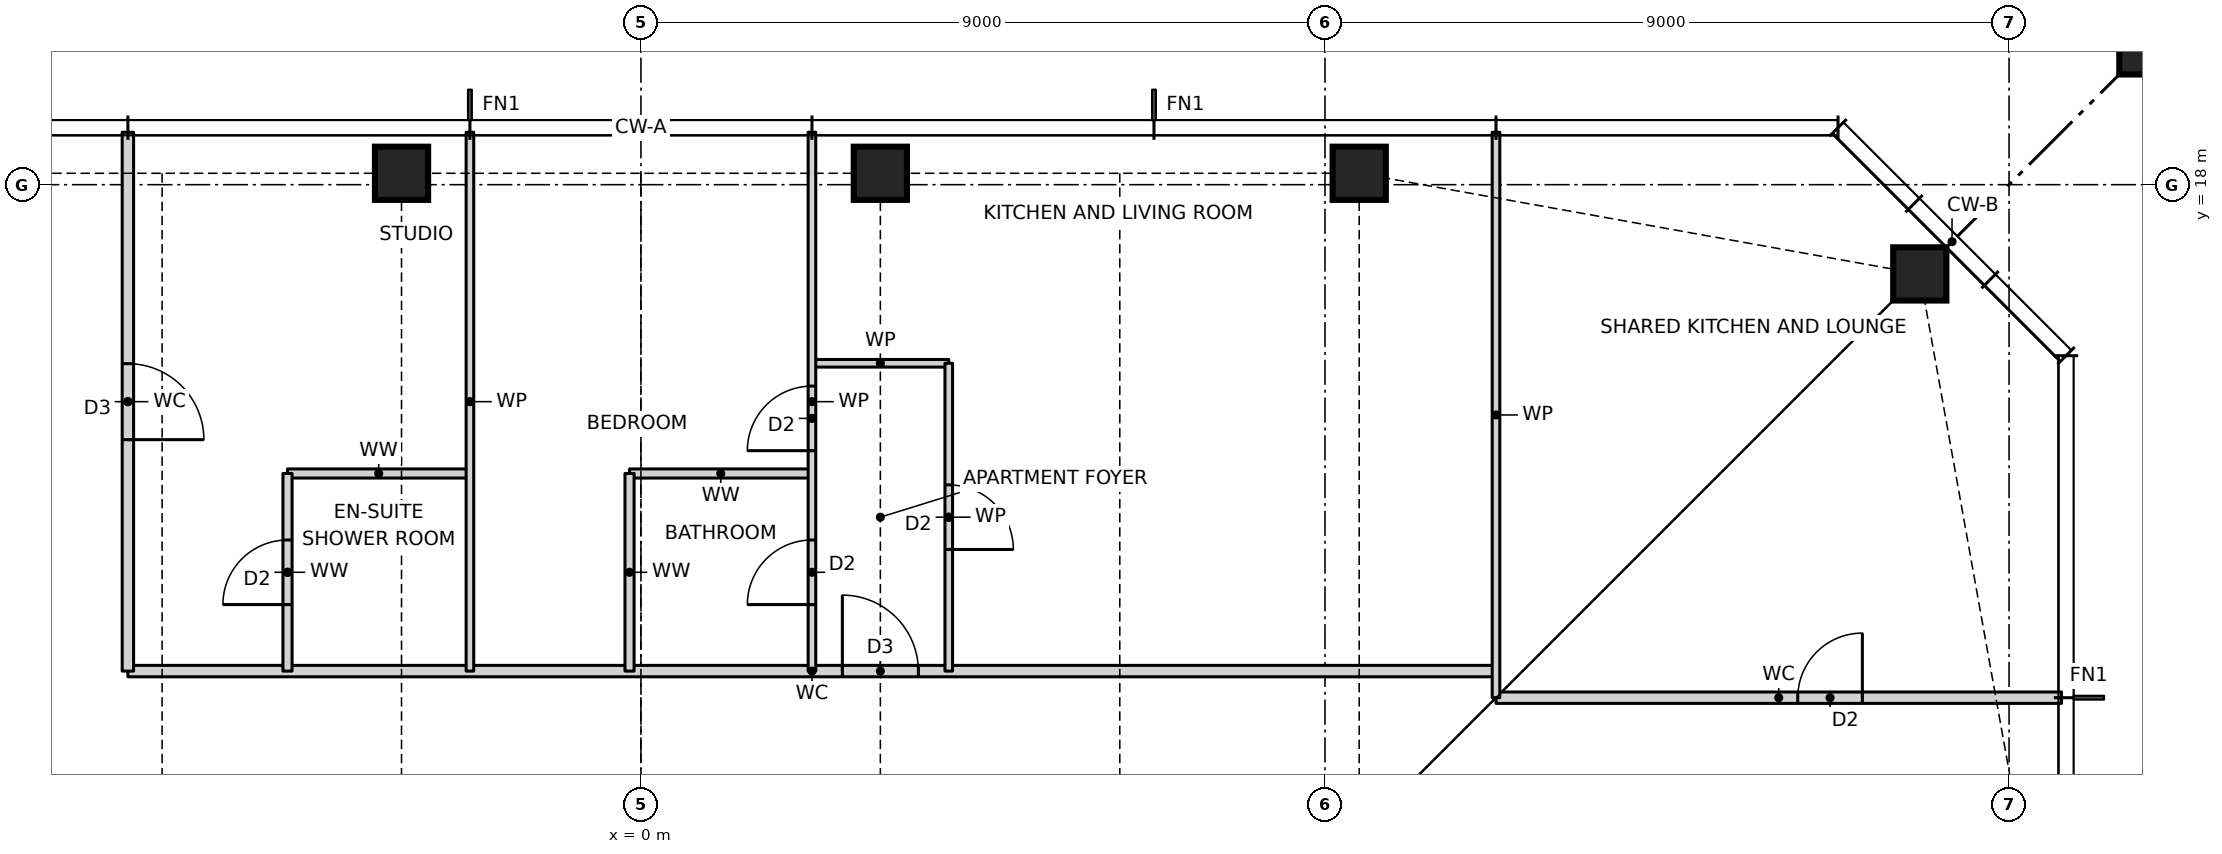
"""IFC4 building model, lengths in metres.
Left out: names, types, materials, properties, quantities, classifications, styles, units other than length and angle.
Written with IfcOpenShell. Run it as: python <this file> out.ifc"""

import sys

from ifc_helpers import new_model, si_unit, direction, frame, frame_2d, origin, origin_2d, place, context, subcontext, project, spatial, rectangle, hollow_rectangle, i_section, extrude, element, fill, save


model = new_model("IFC4")
c1 = context("Model", 3, precision=1e-05, world=origin(), true_north=direction((0.0, 1.0)))
c2 = subcontext(c1, "Body", "Model", "MODEL_VIEW")
j1 = project(units=[si_unit("LENGTHUNIT", "METRE"), si_unit("PLANEANGLEUNIT", "RADIAN")], contexts=[c1])
p1 = place(None, origin())
s1 = spatial("IfcSite", under=j1, at=p1, CompositionType="ELEMENT")
p2 = place(p1, origin())
s2 = spatial("IfcBuilding", under=s1, at=p2, CompositionType="ELEMENT")
p3 = place(p2, frame((0.0, 0.0, 167.0)))
s3 = spatial("IfcBuildingStorey", under=s2, at=p3, CompositionType="ELEMENT", Elevation=167.0)
for number, where, z_axis, x_axis in (
    (1, (16.826, 16.826, 0.0), (0.0, 0.0, 1.0), (1.0, 0.0, 0.0)),
    (2, (9.45, 18.15, 0.0), (0.0, 0.0, 1.0), (1.0, 0.0, 0.0)),
    (3, (3.15, 18.15, 0.0), (0.0, 0.0, 1.0), (1.0, 0.0, 0.0)),
    (4, (-3.15, 18.15, 0.0), (0.0, 0.0, 1.0), (1.0, 0.0, 0.0)),
):
    element("IfcColumn", number, at=place(p3, frame(where, z_axis=z_axis, x_axis=x_axis)), inside=s3, PredefinedType="COLUMN", context=c2, shape_type="SweptSolid", body=[
        extrude(hollow_rectangle(XDim=0.7, YDim=0.7, WallThickness=0.06, at=origin_2d()), origin(), (0.0, 0.0, 1.0), 3.5),
    ])
p4 = place(p3, frame((21.65, 21.65, 0.0), z_axis=(0.0, 0.0, 1.0), x_axis=(1.0, 0.0, 0.0)))
e5 = element("IfcColumn", 5, at=p4, inside=s3, PredefinedType="COLUMN", context=c2, shape_type="SweptSolid", body=[
    extrude(rectangle(XDim=4.4, YDim=4.4, at=origin_2d()), origin(), (0.0, 0.0, 1.0), 3.5),
    extrude(i_section(OverallWidth=0.478, OverallDepth=0.599, WebThickness=0.1, FlangeThickness=0.14, at=origin_2d()), origin(), (0.0, 0.0, 1.0), 3.5),
])
p5 = place(p3, frame((11.25, 11.25, 0.0), z_axis=(0.0, 0.0, 1.0), x_axis=(1.0, 0.0, 0.0)))
e6 = element("IfcWall", 6, at=p5, inside=s3, PredefinedType="PARTITIONING", context=c2, shape_type="SweptSolid", body=[
    extrude(rectangle(XDim=7.44, YDim=0.15, at=frame_2d((3.72, 0.0))), origin(), (0.0, 0.0, 1.0), 3.27),
])
p6 = place(p5, frame((3.97, 0.0, 0.0)))
e7 = element("IfcOpeningElement", 7, at=p6, cuts=e6, PredefinedType="OPENING", context=c2, shape_type="SweptSolid", body=[
    extrude(rectangle(XDim=0.85, YDim=2.1, at=frame_2d((0.425, 1.05))), frame((0.0, 0.085, 0.0), z_axis=(0.0, -1.0, 0.0), x_axis=(1.0, 0.0, 0.0)), (0.0, 0.0, 1.0), 0.17),
])
p7 = place(p3, frame((-6.75, 11.6, 0.0), z_axis=(0.0, 0.0, 1.0), x_axis=(1.0, 0.0, 0.0)))
e8 = element("IfcWall", 8, at=p7, inside=s3, PredefinedType="PARTITIONING", context=c2, shape_type="SweptSolid", body=[
    extrude(rectangle(XDim=18.0, YDim=0.15, at=frame_2d((9.0, 0.0))), origin(), (0.0, 0.0, 1.0), 3.27),
])
p8 = place(p7, frame((9.4, 0.0, 0.0)))
e9 = element("IfcOpeningElement", 9, at=p8, cuts=e8, PredefinedType="OPENING", context=c2, shape_type="SweptSolid", body=[
    extrude(rectangle(XDim=1.0, YDim=2.1, at=frame_2d((0.5, 1.05))), frame((0.0, 0.085, 0.0), z_axis=(0.0, -1.0, 0.0), x_axis=(1.0, 0.0, 0.0)), (0.0, 0.0, 1.0), 0.17),
])
for number, where, z_axis, x_axis in (
    (10, (-4.65, 14.2, 0.0), (0.0, 0.0, 1.0), (1.0, 0.0, 0.0)),
    (11, (-0.15, 14.2, 0.0), (0.0, 0.0, 1.0), (1.0, 0.0, 0.0)),
):
    element("IfcWall", number, at=place(p3, frame(where, z_axis=z_axis, x_axis=x_axis)), inside=s3, PredefinedType="PARTITIONING", context=c2, shape_type="SweptSolid", body=[
        extrude(rectangle(XDim=2.4, YDim=0.12, at=frame_2d((1.2, 0.0))), origin(), (0.0, 0.0, 1.0), 3.27),
    ])
p9 = place(p3, frame((2.25, 15.65, 0.0), z_axis=(0.0, 0.0, 1.0), x_axis=(1.0, 0.0, 0.0)))
e12 = element("IfcWall", 12, at=p9, inside=s3, PredefinedType="PARTITIONING", context=c2, shape_type="SweptSolid", body=[
    extrude(rectangle(XDim=1.8, YDim=0.1, at=frame_2d((0.9, 0.0))), origin(), (0.0, 0.0, 1.0), 3.27),
])
p10 = place(p3, frame((11.25, 11.25, 0.0), z_axis=(0.0, 0.0, 1.0), x_axis=(0.0, 1.0, 0.0)))
e13 = element("IfcWall", 13, at=p10, inside=s3, PredefinedType="PARTITIONING", context=c2, shape_type="SweptSolid", body=[
    extrude(rectangle(XDim=7.44, YDim=0.1, at=frame_2d((3.72, 0.0))), origin(), (0.0, 0.0, 1.0), 3.27),
])
p11 = place(p3, frame((4.05, 11.6, 0.0), z_axis=(0.0, 0.0, 1.0), x_axis=(0.0, 1.0, 0.0)))
e14 = element("IfcWall", 14, at=p11, inside=s3, PredefinedType="PARTITIONING", context=c2, shape_type="SweptSolid", body=[
    extrude(rectangle(XDim=4.05, YDim=0.1, at=frame_2d((2.025, 0.0))), origin(), (0.0, 0.0, 1.0), 3.27),
])
p12 = place(p11, frame((1.6, 0.0, 0.0)))
e15 = element("IfcOpeningElement", 15, at=p12, cuts=e14, PredefinedType="OPENING", context=c2, shape_type="SweptSolid", body=[
    extrude(rectangle(XDim=0.85, YDim=2.1, at=frame_2d((0.425, 1.05))), frame((0.0, 0.06, 0.0), z_axis=(0.0, -1.0, 0.0), x_axis=(1.0, 0.0, 0.0)), (0.0, 0.0, 1.0), 0.12),
])
p13 = place(p3, frame((2.25, 11.6, 0.0), z_axis=(0.0, 0.0, 1.0), x_axis=(0.0, 1.0, 0.0)))
e16 = element("IfcWall", 16, at=p13, inside=s3, PredefinedType="PARTITIONING", context=c2, shape_type="SweptSolid", body=[
    extrude(rectangle(XDim=7.09, YDim=0.1, at=frame_2d((3.545, 0.0))), origin(), (0.0, 0.0, 1.0), 3.27),
])
p14 = place(p13, frame((2.9, 0.0, 0.0)))
e17 = element("IfcOpeningElement", 17, at=p14, cuts=e16, PredefinedType="OPENING", context=c2, shape_type="SweptSolid", body=[
    extrude(rectangle(XDim=0.85, YDim=2.1, at=frame_2d((0.425, 1.05))), frame((0.0, 0.06, 0.0), z_axis=(0.0, -1.0, 0.0), x_axis=(1.0, 0.0, 0.0)), (0.0, 0.0, 1.0), 0.12),
])
p15 = place(p13, frame((0.875, 0.0, 0.0)))
e18 = element("IfcOpeningElement", 18, at=p15, cuts=e16, PredefinedType="OPENING", context=c2, shape_type="SweptSolid", body=[
    extrude(rectangle(XDim=0.85, YDim=2.1, at=frame_2d((0.425, 1.05))), frame((0.0, 0.06, 0.0), z_axis=(0.0, -1.0, 0.0), x_axis=(1.0, 0.0, 0.0)), (0.0, 0.0, 1.0), 0.12),
])
p16 = place(p3, frame((-0.15, 11.6, 0.0), z_axis=(0.0, 0.0, 1.0), x_axis=(0.0, 1.0, 0.0)))
e19 = element("IfcWall", 19, at=p16, inside=s3, PredefinedType="PARTITIONING", context=c2, shape_type="SweptSolid", body=[
    extrude(rectangle(XDim=2.6, YDim=0.12, at=frame_2d((1.3, 0.0))), origin(), (0.0, 0.0, 1.0), 3.27),
])
p17 = place(p3, frame((-2.25, 11.6, 0.0), z_axis=(0.0, 0.0, 1.0), x_axis=(0.0, 1.0, 0.0)))
e20 = element("IfcWall", 20, at=p17, inside=s3, PredefinedType="PARTITIONING", context=c2, shape_type="SweptSolid", body=[
    extrude(rectangle(XDim=7.09, YDim=0.1, at=frame_2d((3.545, 0.0))), origin(), (0.0, 0.0, 1.0), 3.27),
])
p18 = place(p3, frame((-4.65, 11.6, 0.0), z_axis=(0.0, 0.0, 1.0), x_axis=(0.0, 1.0, 0.0)))
e21 = element("IfcWall", 21, at=p18, inside=s3, PredefinedType="PARTITIONING", context=c2, shape_type="SweptSolid", body=[
    extrude(rectangle(XDim=2.6, YDim=0.12, at=frame_2d((1.3, 0.0))), origin(), (0.0, 0.0, 1.0), 3.27),
])
p19 = place(p18, frame((0.875, 0.0, 0.0)))
e22 = element("IfcOpeningElement", 22, at=p19, cuts=e21, PredefinedType="OPENING", context=c2, shape_type="SweptSolid", body=[
    extrude(rectangle(XDim=0.85, YDim=2.1, at=frame_2d((0.425, 1.05))), frame((0.0, 0.07, 0.0), z_axis=(0.0, -1.0, 0.0), x_axis=(1.0, 0.0, 0.0)), (0.0, 0.0, 1.0), 0.14),
])
p20 = place(p3, frame((-6.75, 11.6, 0.0), z_axis=(0.0, 0.0, 1.0), x_axis=(0.0, 1.0, 0.0)))
e23 = element("IfcWall", 23, at=p20, inside=s3, PredefinedType="PARTITIONING", context=c2, shape_type="SweptSolid", body=[
    extrude(rectangle(XDim=7.09, YDim=0.15, at=frame_2d((3.545, 0.0))), origin(), (0.0, 0.0, 1.0), 3.27),
])
p21 = place(p20, frame((3.045, 0.0, 0.0)))
e24 = element("IfcOpeningElement", 24, at=p21, cuts=e23, PredefinedType="OPENING", context=c2, shape_type="SweptSolid", body=[
    extrude(rectangle(XDim=1.0, YDim=2.1, at=frame_2d((0.5, 1.05))), frame((0.0, 0.085, 0.0), z_axis=(0.0, -1.0, 0.0), x_axis=(1.0, 0.0, 0.0)), (0.0, 0.0, 1.0), 0.17),
])
p22 = place(p8, origin())
e25 = element("IfcDoor", 25, at=p22, inside=s3, OperationType="SINGLE_SWING_LEFT", PredefinedType="DOOR", context=c2, shape_type="SweptSolid", body=[
    extrude(rectangle(XDim=1.0, YDim=2.1, at=frame_2d((0.5, 1.05))), frame((0.0, 0.025, 0.0), z_axis=(0.0, -1.0, 0.0), x_axis=(1.0, 0.0, 0.0)), (0.0, 0.0, 1.0), 0.05),
])
fill(e9, e25)
p23 = place(p12, frame((0.85, 0.0, 0.0), z_axis=(0.0, 0.0, 1.0), x_axis=(-1.0, 0.0, 0.0)))
e26 = element("IfcDoor", 26, at=p23, inside=s3, OperationType="SINGLE_SWING_RIGHT", PredefinedType="DOOR", context=c2, shape_type="SweptSolid", body=[
    extrude(rectangle(XDim=0.85, YDim=2.1, at=frame_2d((0.425, 1.05))), frame((0.0, 0.025, 0.0), z_axis=(0.0, -1.0, 0.0), x_axis=(1.0, 0.0, 0.0)), (0.0, 0.0, 1.0), 0.05),
])
fill(e15, e26)
p24 = place(p14, origin())
e27 = element("IfcDoor", 27, at=p24, inside=s3, OperationType="SINGLE_SWING_LEFT", PredefinedType="DOOR", context=c2, shape_type="SweptSolid", body=[
    extrude(rectangle(XDim=0.85, YDim=2.1, at=frame_2d((0.425, 1.05))), frame((0.0, 0.025, 0.0), z_axis=(0.0, -1.0, 0.0), x_axis=(1.0, 0.0, 0.0)), (0.0, 0.0, 1.0), 0.05),
])
fill(e17, e27)
p25 = place(p15, origin())
e28 = element("IfcDoor", 28, at=p25, inside=s3, OperationType="SINGLE_SWING_LEFT", PredefinedType="DOOR", context=c2, shape_type="SweptSolid", body=[
    extrude(rectangle(XDim=0.85, YDim=2.1, at=frame_2d((0.425, 1.05))), frame((0.0, 0.025, 0.0), z_axis=(0.0, -1.0, 0.0), x_axis=(1.0, 0.0, 0.0)), (0.0, 0.0, 1.0), 0.05),
])
fill(e18, e28)
p26 = place(p21, frame((1.0, 0.0, 0.0), z_axis=(0.0, 0.0, 1.0), x_axis=(-1.0, 0.0, 0.0)))
e29 = element("IfcDoor", 29, at=p26, inside=s3, OperationType="SINGLE_SWING_RIGHT", PredefinedType="DOOR", context=c2, shape_type="SweptSolid", body=[
    extrude(rectangle(XDim=1.0, YDim=2.1, at=frame_2d((0.5, 1.05))), frame((0.0, 0.025, 0.0), z_axis=(0.0, -1.0, 0.0), x_axis=(1.0, 0.0, 0.0)), (0.0, 0.0, 1.0), 0.05),
])
fill(e24, e29)
p27 = place(p19, origin())
e30 = element("IfcDoor", 30, at=p27, inside=s3, OperationType="SINGLE_SWING_LEFT", PredefinedType="DOOR", context=c2, shape_type="SweptSolid", body=[
    extrude(rectangle(XDim=0.85, YDim=2.1, at=frame_2d((0.425, 1.05))), frame((0.0, 0.025, 0.0), z_axis=(0.0, -1.0, 0.0), x_axis=(1.0, 0.0, 0.0)), (0.0, 0.0, 1.0), 0.05),
])
fill(e22, e30)
p28 = place(p6, origin())
e31 = element("IfcDoor", 31, at=p28, inside=s3, OperationType="SINGLE_SWING_RIGHT", PredefinedType="DOOR", context=c2, shape_type="SweptSolid", body=[
    extrude(rectangle(XDim=0.85, YDim=2.1, at=frame_2d((0.425, 1.05))), frame((0.0, 0.025, 0.0), z_axis=(0.0, -1.0, 0.0), x_axis=(1.0, 0.0, 0.0)), (0.0, 0.0, 1.0), 0.05),
])
fill(e7, e31)
save(model, sys.argv[1])
